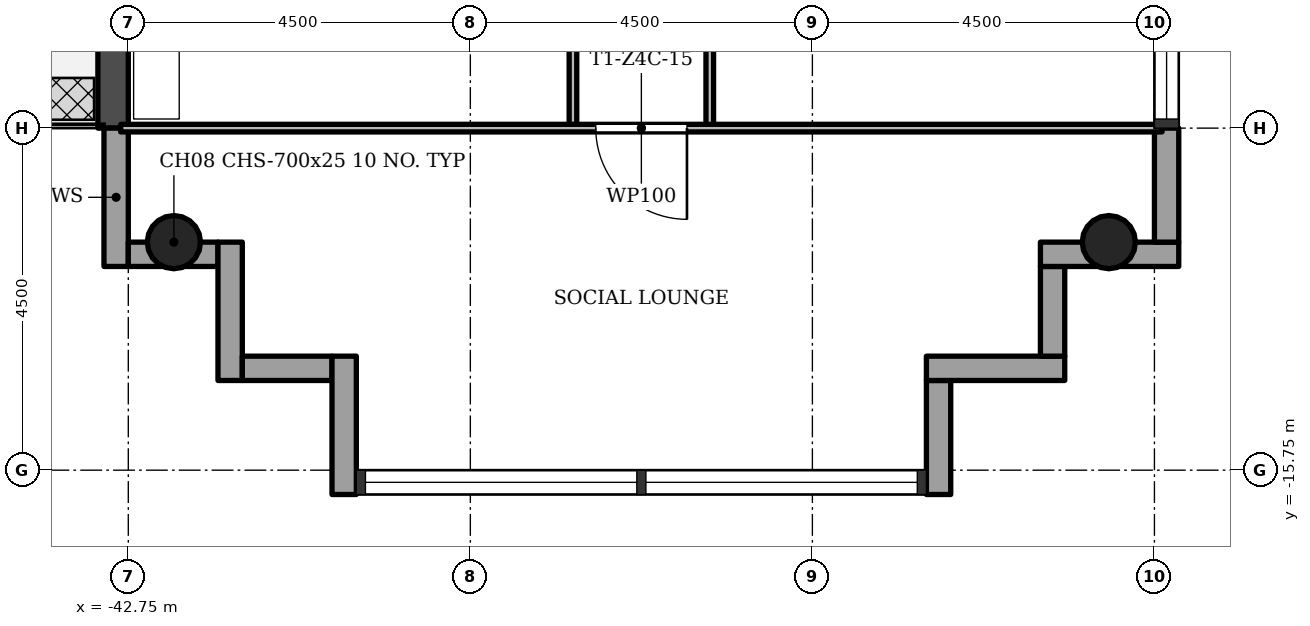
"""IFC4 building model, lengths in metres.
Left out: names, types, materials, properties, quantities, classifications, styles, units other than length and angle.
Written with IfcOpenShell. Run it as: python <this file> out.ifc"""

import sys

from ifc_helpers import new_model, si_unit, direction, frame, frame_2d, origin, origin_2d, place, context, subcontext, project, spatial, rectangle, hollow_circle, extrude, element, fill, save


model = new_model("IFC4")
c1 = context("Model", 3, precision=1e-05, world=origin(), true_north=direction((0.0, 1.0)))
c2 = subcontext(c1, "Body", "Model", "MODEL_VIEW")
j1 = project(units=[si_unit("LENGTHUNIT", "METRE"), si_unit("PLANEANGLEUNIT", "RADIAN")], contexts=[c1])
p1 = place(None, origin())
s1 = spatial("IfcSite", under=j1, at=p1, CompositionType="ELEMENT")
p2 = place(p1, origin())
s2 = spatial("IfcBuilding", under=s1, at=p2, CompositionType="ELEMENT")
p3 = place(p2, frame((0.0, 0.0, 192.6)))
s3 = spatial("IfcBuildingStorey", under=s2, at=p3, CompositionType="ELEMENT", Elevation=192.6)
for number, where, z_axis, x_axis in (
    (1, (-42.15, -12.75, 0.0), (0.0, 0.0, 1.0), (1.0, 0.0, 0.0)),
    (2, (-29.85, -12.75, 0.0), (0.0, 0.0, 1.0), (1.0, 0.0, 0.0)),
):
    element("IfcColumn", number, at=place(p3, frame(where, z_axis=z_axis, x_axis=x_axis)), inside=s3, PredefinedType="COLUMN", context=c2, shape_type="SweptSolid", body=[
        extrude(hollow_circle(Radius=0.35, WallThickness=0.025, at=origin_2d()), origin(), (0.0, 0.0, 1.0), 3.4),
    ])
p4 = place(p3, frame((-42.95, -6.75, -0.02), z_axis=(0.0, 0.0, 1.0), x_axis=(0.0, -1.0, 0.0)))
e3 = element("IfcWall", 3, at=p4, inside=s3, PredefinedType="STANDARD", context=c2, shape_type="SweptSolid", body=[
    extrude(rectangle(XDim=4.5, YDim=0.4, at=frame_2d((2.25, 0.0))), origin(), (0.0, 0.0, 1.0), 3.12),
])
p5 = place(p4, frame((1.35, 0.0, 0.02)))
e4 = element("IfcOpeningElement", 4, at=p5, cuts=e3, PredefinedType="OPENING", context=c2, shape_type="SweptSolid", body=[
    extrude(rectangle(XDim=1.8, YDim=2.1, at=frame_2d((0.9, 1.05))), frame((0.0, 0.21, 0.0), z_axis=(0.0, -1.0, 0.0), x_axis=(1.0, 0.0, 0.0)), (0.0, 0.0, 1.0), 0.42),
])
p6 = place(p3, frame((-42.91, -11.25, -0.3), z_axis=(0.0, 0.0, 1.0), x_axis=(0.0, -1.0, 0.0)))
e5 = element("IfcWall", 5, at=p6, inside=s3, PredefinedType="STANDARD", context=c2, shape_type="SweptSolid", body=[
    extrude(rectangle(XDim=1.82, YDim=0.32, at=frame_2d((0.91, 0.0))), origin(), (0.0, 0.0, 1.0), 3.4),
])
p7 = place(p3, frame((-42.75, -12.91, -0.3), z_axis=(0.0, 0.0, 1.0), x_axis=(1.0, 0.0, 0.0)))
e6 = element("IfcWall", 6, at=p7, inside=s3, PredefinedType="STANDARD", context=c2, shape_type="SweptSolid", body=[
    extrude(rectangle(XDim=1.18, YDim=0.32, at=frame_2d((0.59, 0.0))), origin(), (0.0, 0.0, 1.0), 3.4),
])
p8 = place(p3, frame((-41.41, -12.75, -0.3), z_axis=(0.0, 0.0, 1.0), x_axis=(0.0, -1.0, 0.0)))
e7 = element("IfcWall", 7, at=p8, inside=s3, PredefinedType="STANDARD", context=c2, shape_type="SweptSolid", body=[
    extrude(rectangle(XDim=1.82, YDim=0.32, at=frame_2d((0.91, 0.0))), origin(), (0.0, 0.0, 1.0), 3.4),
])
p9 = place(p3, frame((-41.25, -14.41, -0.3), z_axis=(0.0, 0.0, 1.0), x_axis=(1.0, 0.0, 0.0)))
e8 = element("IfcWall", 8, at=p9, inside=s3, PredefinedType="STANDARD", context=c2, shape_type="SweptSolid", body=[
    extrude(rectangle(XDim=1.18, YDim=0.32, at=frame_2d((0.59, 0.0))), origin(), (0.0, 0.0, 1.0), 3.4),
])
p10 = place(p3, frame((-39.91, -14.25, -0.3), z_axis=(0.0, 0.0, 1.0), x_axis=(0.0, -1.0, 0.0)))
e9 = element("IfcWall", 9, at=p10, inside=s3, PredefinedType="STANDARD", context=c2, shape_type="SweptSolid", body=[
    extrude(rectangle(XDim=1.82, YDim=0.32, at=frame_2d((0.91, 0.0))), origin(), (0.0, 0.0, 1.0), 3.4),
])
p11 = place(p3, frame((-32.09, -16.07, -0.3), z_axis=(0.0, 0.0, 1.0), x_axis=(0.0, 1.0, 0.0)))
e10 = element("IfcWall", 10, at=p11, inside=s3, PredefinedType="STANDARD", context=c2, shape_type="SweptSolid", body=[
    extrude(rectangle(XDim=1.5, YDim=0.32, at=frame_2d((0.75, 0.0))), origin(), (0.0, 0.0, 1.0), 3.4),
])
p12 = place(p3, frame((-32.25, -14.41, -0.3), z_axis=(0.0, 0.0, 1.0), x_axis=(1.0, 0.0, 0.0)))
e11 = element("IfcWall", 11, at=p12, inside=s3, PredefinedType="STANDARD", context=c2, shape_type="SweptSolid", body=[
    extrude(rectangle(XDim=1.82, YDim=0.32, at=frame_2d((0.91, 0.0))), origin(), (0.0, 0.0, 1.0), 3.4),
])
p13 = place(p3, frame((-30.59, -14.25, -0.3), z_axis=(0.0, 0.0, 1.0), x_axis=(0.0, 1.0, 0.0)))
e12 = element("IfcWall", 12, at=p13, inside=s3, PredefinedType="STANDARD", context=c2, shape_type="SweptSolid", body=[
    extrude(rectangle(XDim=1.18, YDim=0.32, at=frame_2d((0.59, 0.0))), origin(), (0.0, 0.0, 1.0), 3.4),
])
p14 = place(p3, frame((-30.75, -12.91, -0.3), z_axis=(0.0, 0.0, 1.0), x_axis=(1.0, 0.0, 0.0)))
e13 = element("IfcWall", 13, at=p14, inside=s3, PredefinedType="STANDARD", context=c2, shape_type="SweptSolid", body=[
    extrude(rectangle(XDim=1.82, YDim=0.32, at=frame_2d((0.91, 0.0))), origin(), (0.0, 0.0, 1.0), 3.4),
])
p15 = place(p3, frame((-29.09, -12.75, -0.3), z_axis=(0.0, 0.0, 1.0), x_axis=(0.0, 1.0, 0.0)))
e14 = element("IfcWall", 14, at=p15, inside=s3, PredefinedType="STANDARD", context=c2, shape_type="SweptSolid", body=[
    extrude(rectangle(XDim=1.5, YDim=0.32, at=frame_2d((0.75, 0.0))), origin(), (0.0, 0.0, 1.0), 3.4),
])
p16 = place(p3, frame((-36.9, -11.25, 0.0), z_axis=(0.0, 0.0, 1.0), x_axis=(0.0, 1.0, 0.0)))
e15 = element("IfcWall", 15, at=p16, inside=s3, PredefinedType="PARTITIONING", context=c2, shape_type="SweptSolid", body=[
    extrude(rectangle(XDim=6.75, YDim=0.1, at=frame_2d((3.375, 0.0))), origin(), (0.0, 0.0, 1.0), 3.0),
])
p17 = place(p16, frame((1.8, 0.0, 0.0)))
e16 = element("IfcOpeningElement", 16, at=p17, cuts=e15, PredefinedType="OPENING", context=c2, shape_type="SweptSolid", body=[
    extrude(rectangle(XDim=0.9, YDim=2.1, at=frame_2d((0.45, 1.05))), frame((0.0, 0.06, 0.0), z_axis=(0.0, -1.0, 0.0), x_axis=(1.0, 0.0, 0.0)), (0.0, 0.0, 1.0), 0.12),
])
p18 = place(p3, frame((-35.1, -11.25, 0.0), z_axis=(0.0, 0.0, 1.0), x_axis=(0.0, 1.0, 0.0)))
e17 = element("IfcWall", 17, at=p18, inside=s3, PredefinedType="PARTITIONING", context=c2, shape_type="SweptSolid", body=[
    extrude(rectangle(XDim=6.75, YDim=0.1, at=frame_2d((3.375, 0.0))), origin(), (0.0, 0.0, 1.0), 3.0),
])
p19 = place(p18, frame((1.8, 0.0, 0.0)))
e18 = element("IfcOpeningElement", 18, at=p19, cuts=e17, PredefinedType="OPENING", context=c2, shape_type="SweptSolid", body=[
    extrude(rectangle(XDim=0.9, YDim=2.1, at=frame_2d((0.45, 1.05))), frame((0.0, 0.06, 0.0), z_axis=(0.0, -1.0, 0.0), x_axis=(1.0, 0.0, 0.0)), (0.0, 0.0, 1.0), 0.12),
])
p20 = place(p3, frame((-42.85, -11.25, 0.0), z_axis=(0.0, 0.0, 1.0), x_axis=(1.0, 0.0, 0.0)))
e19 = element("IfcWall", 19, at=p20, inside=s3, PredefinedType="PARTITIONING", context=c2, shape_type="SweptSolid", body=[
    extrude(rectangle(XDim=13.7, YDim=0.1, at=frame_2d((6.85, 0.0))), origin(), (0.0, 0.0, 1.0), 3.0),
])
p21 = place(p20, frame((6.25, 0.0, 0.0)))
e20 = element("IfcOpeningElement", 20, at=p21, cuts=e19, PredefinedType="OPENING", context=c2, shape_type="SweptSolid", body=[
    extrude(rectangle(XDim=1.2, YDim=2.1, at=frame_2d((0.6, 1.05))), frame((0.0, 0.06, 0.0), z_axis=(0.0, -1.0, 0.0), x_axis=(1.0, 0.0, 0.0)), (0.0, 0.0, 1.0), 0.12),
])
p22 = place(p21, origin())
e21 = element("IfcDoor", 21, at=p22, inside=s3, OperationType="SINGLE_SWING_RIGHT", PredefinedType="DOOR", context=c2, shape_type="SweptSolid", body=[
    extrude(rectangle(XDim=1.2, YDim=2.1, at=frame_2d((0.6, 1.05))), frame((0.0, 0.025, 0.0), z_axis=(0.0, -1.0, 0.0), x_axis=(1.0, 0.0, 0.0)), (0.0, 0.0, 1.0), 0.05),
])
fill(e20, e21)
save(model, sys.argv[1])
